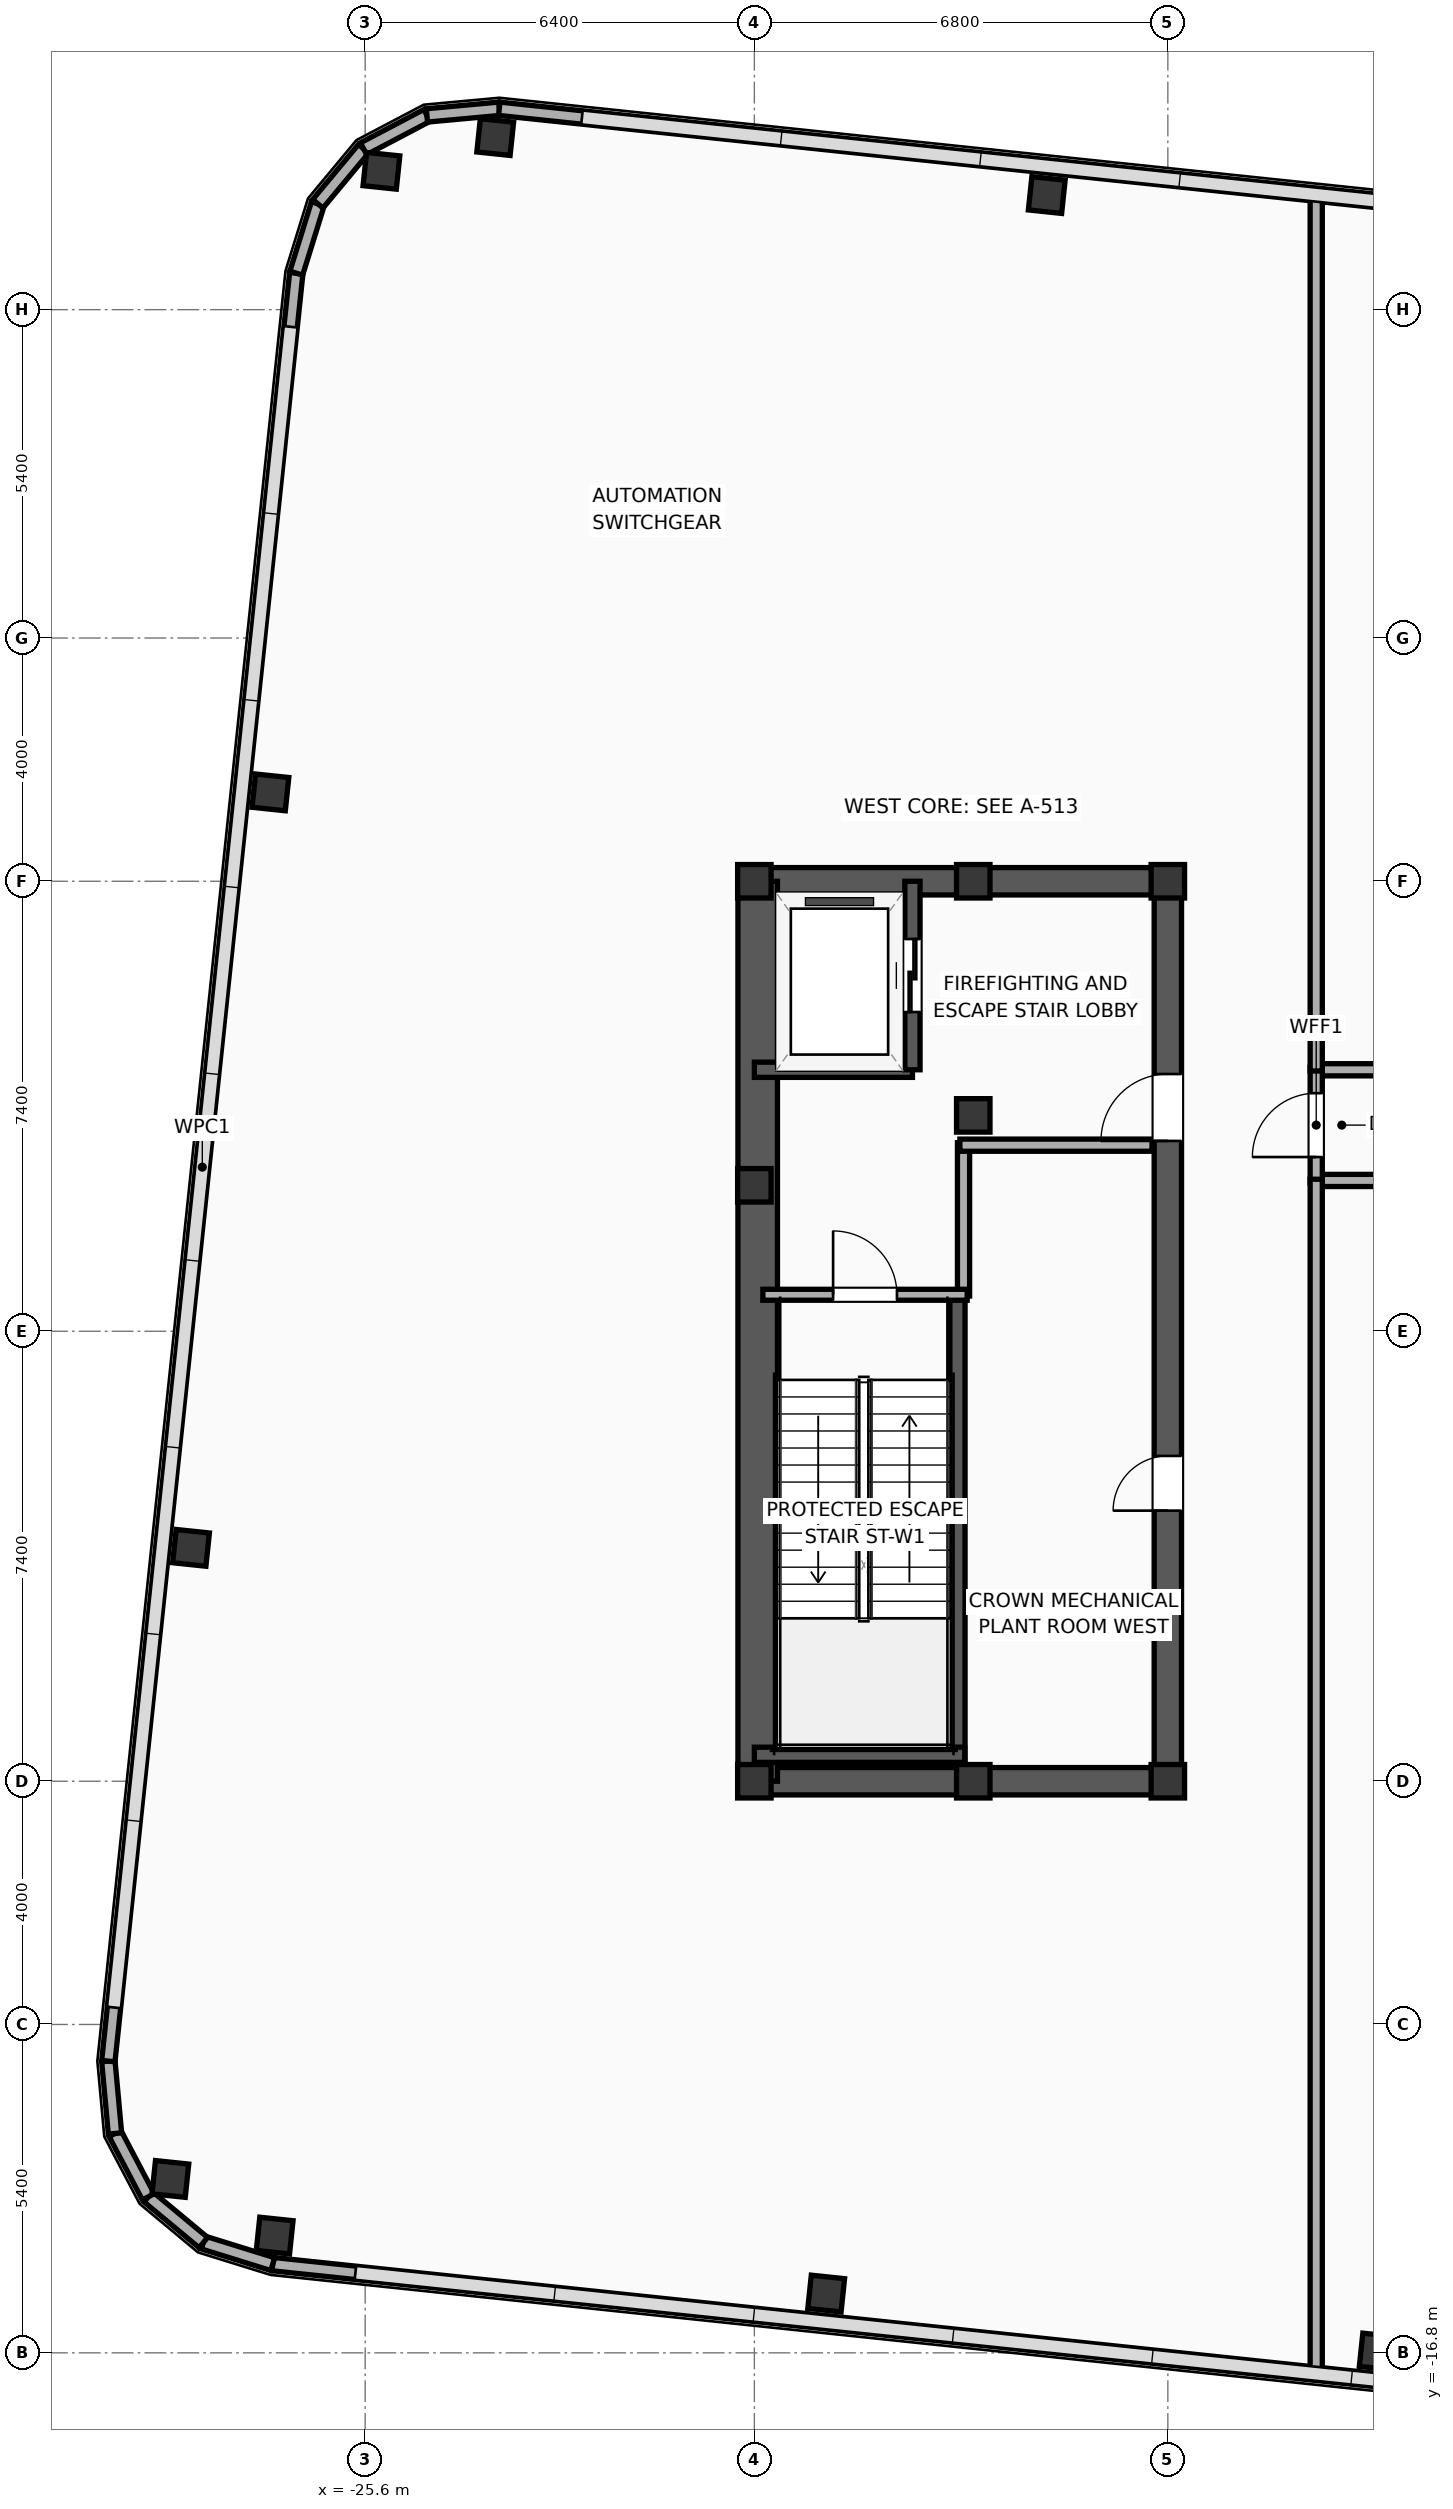
"""IFC4 building model, lengths in metres.
Left out: names, types, materials, properties, quantities, classifications, styles, units other than length and angle.
Written with IfcOpenShell. Run it as: python <this file> out.ifc"""

import sys

from ifc_helpers import new_model, si_unit, direction, frame, frame_2d, origin, origin_2d, place, context, subcontext, project, spatial, rectangle, hollow_rectangle, extrude, element, fill, save


model = new_model("IFC4")
c1 = context("Model", 3, precision=1e-05, world=origin(), true_north=direction((0.0, 1.0)))
c2 = subcontext(c1, "Body", "Model", "MODEL_VIEW")
j1 = project(units=[si_unit("LENGTHUNIT", "METRE"), si_unit("PLANEANGLEUNIT", "RADIAN")], contexts=[c1])
p1 = place(None, origin())
s1 = spatial("IfcSite", under=j1, at=p1, CompositionType="ELEMENT")
p2 = place(p1, origin())
s2 = spatial("IfcBuilding", under=s1, at=p2, CompositionType="ELEMENT")
p3 = place(p2, frame((0.0, 0.0, 316.0)))
s3 = spatial("IfcBuildingStorey", under=s2, at=p3, CompositionType="ELEMENT", Elevation=316.0)
for number, where, z_axis, x_axis in (
    (1, (-19.2, -7.4, 0.0), (0.0, 0.0, 1.0), (1.0, 0.0, 0.0)),
    (2, (-19.2, 2.4, 0.0), (0.0, 0.0, 1.0), (1.0, 0.0, 0.0)),
    (3, (-19.2, 7.4, 0.0), (0.0, 0.0, 1.0), (1.0, 0.0, 0.0)),
    (4, (-15.6, -7.4, 0.0), (0.0, 0.0, 1.0), (1.0, 0.0, 0.0)),
    (5, (-15.6, 7.4, 0.0), (0.0, 0.0, 1.0), (1.0, 0.0, 0.0)),
    (6, (-12.4, -7.4, 0.0), (0.0, 0.0, 1.0), (1.0, 0.0, 0.0)),
    (7, (-15.6, 3.55, 0.0), (0.0, 0.0, 1.0), (1.0, 0.0, 0.0)),
    (8, (-12.4, 7.4, 0.0), (0.0, 0.0, 1.0), (1.0, 0.0, 0.0)),
):
    element("IfcColumn", number, at=place(p3, frame(where, z_axis=z_axis, x_axis=x_axis)), inside=s3, PredefinedType="COLUMN", context=c2, shape_type="SweptSolid", body=[
        extrude(hollow_rectangle(XDim=0.55, YDim=0.55, WallThickness=0.022, at=origin_2d()), origin(), (0.0, 0.0, 1.0), 5.3),
    ])
for number, where, z_axis, x_axis in (
    (9, (-19.425, -7.4, 0.0), (0.0, 0.0, 1.0), (1.0, 0.0, 0.0)),
    (10, (-19.425, 7.4, 0.0), (0.0, 0.0, 1.0), (1.0, 0.0, 0.0)),
):
    element("IfcWall", number, at=place(p3, frame(where, z_axis=z_axis, x_axis=x_axis)), inside=s3, PredefinedType="SHEAR", context=c2, shape_type="SweptSolid", body=[
        extrude(rectangle(XDim=7.25, YDim=0.45, at=frame_2d((3.625, 0.0))), origin(), (0.0, 0.0, 1.0), 5.025),
    ])
p4 = place(p3, frame((-19.145, -7.4, 0.0), z_axis=(0.0, 0.0, 1.0), x_axis=(0.0, 1.0, 0.0)))
e11 = element("IfcWall", 11, at=p4, inside=s3, PredefinedType="SHEAR", context=c2, shape_type="SweptSolid", body=[
    extrude(rectangle(XDim=14.8, YDim=0.65, at=frame_2d((7.4, 0.0))), origin(), (0.0, 0.0, 1.0), 5.025),
])
p5 = place(p3, frame((-12.4, -7.4, 0.0), z_axis=(0.0, 0.0, 1.0), x_axis=(0.0, 1.0, 0.0)))
e12 = element("IfcWall", 12, at=p5, inside=s3, PredefinedType="SHEAR", context=c2, shape_type="SweptSolid", body=[
    extrude(rectangle(XDim=14.8, YDim=0.45, at=frame_2d((7.4, 0.0))), origin(), (0.0, 0.0, 1.0), 5.025),
])
p6 = place(p5, frame((10.53, 0.0, 0.0)))
e13 = element("IfcOpeningElement", 13, at=p6, cuts=e12, PredefinedType="OPENING", context=c2, shape_type="SweptSolid", body=[
    extrude(rectangle(XDim=1.1, YDim=2.05, at=frame_2d((0.55, 1.025))), frame((0.0, 0.235, 0.0), z_axis=(0.0, -1.0, 0.0), x_axis=(1.0, 0.0, 0.0)), (0.0, 0.0, 1.0), 0.47),
])
p7 = place(p5, frame((4.45, 0.0, 0.0)))
e14 = element("IfcOpeningElement", 14, at=p7, cuts=e12, PredefinedType="OPENING", context=c2, shape_type="SweptSolid", body=[
    extrude(rectangle(XDim=0.9, YDim=2.05, at=frame_2d((0.45, 1.025))), frame((0.0, 0.235, 0.0), z_axis=(0.0, -1.0, 0.0), x_axis=(1.0, 0.0, 0.0)), (0.0, 0.0, 1.0), 0.47),
])
p8 = place(p3, frame((-15.86, -7.085, 0.0), z_axis=(0.0, 0.0, 1.0), x_axis=(0.0, 1.0, 0.0)))
e15 = element("IfcWall", 15, at=p8, inside=s3, PredefinedType="SOLIDWALL", context=c2, shape_type="SweptSolid", body=[
    extrude(rectangle(XDim=7.685, YDim=0.25, at=frame_2d((3.843, 0.0))), origin(), (0.0, 0.0, 1.0), 5.025),
])
p9 = place(p3, frame((-19.2, -6.965, 0.0), z_axis=(0.0, 0.0, 1.0), x_axis=(1.0, 0.0, 0.0)))
e16 = element("IfcWall", 16, at=p9, inside=s3, PredefinedType="SOLIDWALL", context=c2, shape_type="SweptSolid", body=[
    extrude(rectangle(XDim=3.46, YDim=0.25, at=frame_2d((1.73, 0.0))), origin(), (0.0, 0.0, 1.0), 5.025),
])
for number, where, z_axis, x_axis in (
    (17, (-27.089, -14.872, 0.0), (0.0, 0.0, 1.0), (0.995, -0.105, 0.0)),
    (18, (-18.019, -15.825, 0.0), (0.0, 0.0, 1.0), (0.995, -0.105, 0.0)),
    (19, (-8.948, -16.778, 0.0), (0.0, 0.0, 1.0), (0.995, -0.105, 0.0)),
    (20, (-14.392, 18.685, 0.0), (0.0, 0.0, 1.0), (0.995, -0.105, 0.0)),
    (21, (-23.461, 19.638, 0.0), (0.0, 0.0, 1.0), (0.995, -0.105, 0.0)),
    (22, (-25.333, 19.084, 0.0), (0.0, 0.0, 1.0), (0.995, -0.105, 0.0)),
    (23, (-27.158, 8.862, 0.0), (0.0, 0.0, 1.0), (0.995, -0.105, 0.0)),
    (24, (-28.464, -3.562, 0.0), (0.0, 0.0, 1.0), (0.995, -0.105, 0.0)),
    (25, (-28.804, -13.94, 0.0), (0.0, 0.0, 1.0), (0.995, -0.105, 0.0)),
):
    element("IfcColumn", number, at=place(p3, frame(where, z_axis=z_axis, x_axis=x_axis)), inside=s3, PredefinedType="COLUMN", context=c2, shape_type="SweptSolid", body=[
        extrude(hollow_rectangle(XDim=0.55, YDim=0.55, WallThickness=0.022, at=origin_2d()), origin(), (0.0, 0.0, 1.0), 5.3),
    ])
p10 = place(p3, frame((18.195, -20.104, 0.0), z_axis=(0.0, 0.0, 1.0), x_axis=(-0.994522116558, 0.104526358762, 0.0)))
e26 = element("IfcWall", 26, at=p10, inside=s3, PredefinedType="PARAPET", context=c2, shape_type="SweptSolid", body=[
    extrude(rectangle(XDim=45.564, YDim=0.22, at=frame_2d((22.782, 0.0))), origin(), (0.0, 0.0, 1.0), 1.2),
])
p11 = place(p3, frame((-27.12, -15.341, 0.0), z_axis=(0.0, 0.0, 1.0), x_axis=(-0.95499831015, 0.296611239858, 0.0)))
e27 = element("IfcWall", 27, at=p11, inside=s3, PredefinedType="PARAPET", context=c2, shape_type="SweptSolid", body=[
    extrude(rectangle(XDim=1.195, YDim=0.22, at=frame_2d((0.598, 0.0))), origin(), (0.0, 0.0, 1.0), 1.2),
])
p12 = place(p3, frame((-28.261, -14.987, 0.0), z_axis=(0.0, 0.0, 1.0), x_axis=(-0.768849923601, 0.639429272852, 0.0)))
e28 = element("IfcWall", 28, at=p12, inside=s3, PredefinedType="PARAPET", context=c2, shape_type="SweptSolid", body=[
    extrude(rectangle(XDim=1.177, YDim=0.22, at=frame_2d((0.588, 0.0))), origin(), (0.0, 0.0, 1.0), 1.2),
])
p13 = place(p3, frame((-29.167, -14.234, 0.0), z_axis=(0.0, 0.0, 1.0), x_axis=(-0.46554120999, 0.885026204019, 0.0)))
e29 = element("IfcWall", 29, at=p13, inside=s3, PredefinedType="PARAPET", context=c2, shape_type="SweptSolid", body=[
    extrude(rectangle(XDim=1.177, YDim=0.22, at=frame_2d((0.588, 0.0))), origin(), (0.0, 0.0, 1.0), 1.2),
])
p14 = place(p3, frame((-29.714, -13.192, 0.0), z_axis=(0.0, 0.0, 1.0), x_axis=(-0.091530451467, 0.995802277791, 0.0)))
e30 = element("IfcWall", 30, at=p14, inside=s3, PredefinedType="PARAPET", context=c2, shape_type="SweptSolid", body=[
    extrude(rectangle(XDim=1.195, YDim=0.22, at=frame_2d((0.598, 0.0))), origin(), (0.0, 0.0, 1.0), 1.2),
])
p15 = place(p3, frame((-29.824, -12.002, 0.0), z_axis=(0.0, 0.0, 1.0), x_axis=(0.104528313262, 0.994521911134, 0.0)))
e31 = element("IfcWall", 31, at=p15, inside=s3, PredefinedType="PARAPET", context=c2, shape_type="SweptSolid", body=[
    extrude(rectangle(XDim=29.564, YDim=0.22, at=frame_2d((14.782, 0.0))), origin(), (0.0, 0.0, 1.0), 1.2),
])
p16 = place(p3, frame((-26.733, 17.4, 0.0), z_axis=(0.0, 0.0, 1.0), x_axis=(0.296611239858, 0.95499831015, 0.0)))
e32 = element("IfcWall", 32, at=p16, inside=s3, PredefinedType="PARAPET", context=c2, shape_type="SweptSolid", body=[
    extrude(rectangle(XDim=1.195, YDim=0.22, at=frame_2d((0.598, 0.0))), origin(), (0.0, 0.0, 1.0), 1.2),
])
p17 = place(p3, frame((-26.379, 18.542, 0.0), z_axis=(0.0, 0.0, 1.0), x_axis=(0.639408628756, 0.768867092203, 0.0)))
e33 = element("IfcWall", 33, at=p17, inside=s3, PredefinedType="PARAPET", context=c2, shape_type="SweptSolid", body=[
    extrude(rectangle(XDim=1.177, YDim=0.22, at=frame_2d((0.588, 0.0))), origin(), (0.0, 0.0, 1.0), 1.2),
])
p18 = place(p3, frame((-25.626, 19.446, 0.0), z_axis=(0.0, 0.0, 1.0), x_axis=(0.884985697578, 0.465618207421, 0.0)))
e34 = element("IfcWall", 34, at=p18, inside=s3, PredefinedType="PARAPET", context=c2, shape_type="SweptSolid", body=[
    extrude(rectangle(XDim=1.177, YDim=0.22, at=frame_2d((0.589, 0.0))), origin(), (0.0, 0.0, 1.0), 1.2),
])
p19 = place(p3, frame((-24.585, 19.994, 0.0), z_axis=(0.0, 0.0, 1.0), x_axis=(0.995802277791, 0.091530451467, 0.0)))
e35 = element("IfcWall", 35, at=p19, inside=s3, PredefinedType="PARAPET", context=c2, shape_type="SweptSolid", body=[
    extrude(rectangle(XDim=1.195, YDim=0.22, at=frame_2d((0.598, 0.0))), origin(), (0.0, 0.0, 1.0), 1.2),
])
p20 = place(p3, frame((-23.395, 20.104, 0.0), z_axis=(0.0, 0.0, 1.0), x_axis=(0.994522116558, -0.104526358762, 0.0)))
e36 = element("IfcWall", 36, at=p20, inside=s3, PredefinedType="PARAPET", context=c2, shape_type="SweptSolid", body=[
    extrude(rectangle(XDim=45.564, YDim=0.22, at=frame_2d((22.782, 0.0))), origin(), (0.0, 0.0, 1.0), 1.2),
])
p21 = place(p3, frame((-19.2, 4.3, 0.0), z_axis=(0.0, 0.0, 1.0), x_axis=(1.0, 0.0, 0.0)))
e37 = element("IfcWall", 37, at=p21, inside=s3, PredefinedType="SOLIDWALL", context=c2, shape_type="SweptSolid", body=[
    extrude(rectangle(XDim=2.6, YDim=0.25, at=frame_2d((1.3, 0.0))), origin(), (0.0, 0.0, 1.0), 5.025),
])
p22 = place(p3, frame((-16.6, 4.3, 0.0), z_axis=(0.0, 0.0, 1.0), x_axis=(0.0, 1.0, 0.0)))
e38 = element("IfcWall", 38, at=p22, inside=s3, PredefinedType="SOLIDWALL", context=c2, shape_type="SweptSolid", body=[
    extrude(rectangle(XDim=3.1, YDim=0.25, at=frame_2d((1.55, 0.0))), origin(), (0.0, 0.0, 1.0), 5.025),
])
p23 = place(p22, frame((0.95, 0.0, 0.0)))
e39 = element("IfcOpeningElement", 39, at=p23, cuts=e38, PredefinedType="OPENING", context=c2, shape_type="SweptSolid", body=[
    extrude(rectangle(XDim=1.2, YDim=2.05, at=frame_2d((0.6, 1.025))), frame((0.0, 0.135, 0.0), z_axis=(0.0, -1.0, 0.0), x_axis=(1.0, 0.0, 0.0)), (0.0, 0.0, 1.0), 0.27),
])
p24 = place(p3, frame((-15.76, 0.58, 0.0), z_axis=(0.0, 0.0, 1.0), x_axis=(0.0, 1.0, 0.0)))
e40 = element("IfcWall", 40, at=p24, inside=s3, PredefinedType="PARTITIONING", context=c2, shape_type="SweptSolid", body=[
    extrude(rectangle(XDim=2.52, YDim=0.2, at=frame_2d((1.26, 0.0))), origin(), (0.0, 0.0, 1.0), 5.025),
])
p25 = place(p3, frame((-15.82, 3.06, 0.0), z_axis=(0.0, 0.0, 1.0), x_axis=(1.0, 0.0, 0.0)))
e41 = element("IfcWall", 41, at=p25, inside=s3, PredefinedType="PARTITIONING", context=c2, shape_type="SweptSolid", body=[
    extrude(rectangle(XDim=3.16, YDim=0.2, at=frame_2d((1.58, 0.0))), origin(), (0.0, 0.0, 1.0), 5.025),
])
p26 = place(p3, frame((-19.06, 0.6, 0.0), z_axis=(0.0, 0.0, 1.0), x_axis=(1.0, 0.0, 0.0)))
e42 = element("IfcWall", 42, at=p26, inside=s3, PredefinedType="PARTITIONING", context=c2, shape_type="SweptSolid", body=[
    extrude(rectangle(XDim=3.36, YDim=0.18, at=frame_2d((1.68, 0.0))), origin(), (0.0, 0.0, 1.0), 5.025),
])
p27 = place(p26, frame((1.155, 0.0, 0.0)))
e43 = element("IfcOpeningElement", 43, at=p27, cuts=e42, PredefinedType="OPENING", context=c2, shape_type="SweptSolid", body=[
    extrude(rectangle(XDim=1.05, YDim=2.05, at=frame_2d((0.525, 1.025))), frame((0.0, 0.1, 0.0), z_axis=(0.0, -1.0, 0.0), x_axis=(1.0, 0.0, 0.0)), (0.0, 0.0, 1.0), 0.2),
])
p28 = place(p3, frame((-9.98, 2.48, 0.0), z_axis=(0.0, 0.0, 1.0), x_axis=(1.0, 0.0, 0.0)))
e44 = element("IfcWall", 44, at=p28, inside=s3, PredefinedType="PARTITIONING", context=c2, shape_type="SweptSolid", body=[
    extrude(rectangle(XDim=19.96, YDim=0.2, at=frame_2d((9.98, 0.0))), origin(), (0.0, 0.0, 1.0), 4.595),
])
p29 = place(p28, frame((9.28, 0.0, 0.0)))
e45 = element("IfcOpeningElement", 45, at=p29, cuts=e44, PredefinedType="OPENING", context=c2, shape_type="SweptSolid", body=[
    extrude(rectangle(XDim=1.4, YDim=2.05, at=frame_2d((0.7, 1.025))), frame((0.0, 0.11, 0.0), z_axis=(0.0, -1.0, 0.0), x_axis=(1.0, 0.0, 0.0)), (0.0, 0.0, 1.0), 0.22),
])
p30 = place(p3, frame((-9.98, 4.3, 0.0), z_axis=(0.0, 0.0, 1.0), x_axis=(1.0, 0.0, 0.0)))
e46 = element("IfcWall", 46, at=p30, inside=s3, PredefinedType="PARTITIONING", context=c2, shape_type="SweptSolid", body=[
    extrude(rectangle(XDim=19.96, YDim=0.2, at=frame_2d((9.98, 0.0))), origin(), (0.0, 0.0, 1.0), 5.025),
])
p31 = place(p30, frame((9.28, 0.0, 0.0)))
e47 = element("IfcOpeningElement", 47, at=p31, cuts=e46, PredefinedType="OPENING", context=c2, shape_type="SweptSolid", body=[
    extrude(rectangle(XDim=1.4, YDim=2.05, at=frame_2d((0.7, 1.025))), frame((0.0, 0.11, 0.0), z_axis=(0.0, -1.0, 0.0), x_axis=(1.0, 0.0, 0.0)), (0.0, 0.0, 1.0), 0.22),
])
p32 = place(p3, frame((-9.96, 2.44, 0.0), z_axis=(0.0, 0.0, 1.0), x_axis=(0.0, 1.0, 0.0)))
e48 = element("IfcWall", 48, at=p32, inside=s3, PredefinedType="PARTITIONING", context=c2, shape_type="SweptSolid", body=[
    extrude(rectangle(XDim=1.9, YDim=0.2, at=frame_2d((0.95, 0.0))), origin(), (0.0, 0.0, 1.0), 5.025),
])
p33 = place(p32, frame((0.425, 0.0, 0.0)))
e49 = element("IfcOpeningElement", 49, at=p33, cuts=e48, PredefinedType="OPENING", context=c2, shape_type="SweptSolid", body=[
    extrude(rectangle(XDim=1.05, YDim=2.05, at=frame_2d((0.525, 1.025))), frame((0.0, 0.11, 0.0), z_axis=(0.0, -1.0, 0.0), x_axis=(1.0, 0.0, 0.0)), (0.0, 0.0, 1.0), 0.22),
])
p34 = place(p3, frame((-9.96, -17.125, 0.0), z_axis=(0.0, 0.0, 1.0), x_axis=(0.0, 1.0, 0.0)))
e50 = element("IfcWall", 50, at=p34, inside=s3, PredefinedType="PARTITIONING", context=c2, shape_type="SweptSolid", body=[
    extrude(rectangle(XDim=19.625, YDim=0.2, at=frame_2d((9.812, 0.0))), origin(), (0.0, 0.0, 1.0), 3.915),
])
p35 = place(p3, frame((-9.96, 4.28, 0.0), z_axis=(0.0, 0.0, 1.0), x_axis=(0.0, 1.0, 0.0)))
e51 = element("IfcWall", 51, at=p35, inside=s3, PredefinedType="PARTITIONING", context=c2, shape_type="SweptSolid", body=[
    extrude(rectangle(XDim=14.392, YDim=0.2, at=frame_2d((7.196, 0.0))), origin(), (0.0, 0.0, 1.0), 5.025),
])
p36 = place(p23, origin())
e52 = element("IfcDoor", 52, at=p36, inside=s3, OperationType="SLIDING_TO_LEFT", PredefinedType="DOOR", context=c2, shape_type="SweptSolid", body=[
    extrude(rectangle(XDim=1.2, YDim=2.05, at=frame_2d((0.6, 1.025))), frame((0.0, 0.025, 0.0), z_axis=(0.0, -1.0, 0.0), x_axis=(1.0, 0.0, 0.0)), (0.0, 0.0, 1.0), 0.05),
])
fill(e39, e52)
p37 = place(p27, origin())
e53 = element("IfcDoor", 53, at=p37, inside=s3, OperationType="SINGLE_SWING_LEFT", PredefinedType="DOOR", context=c2, shape_type="SweptSolid", body=[
    extrude(rectangle(XDim=1.05, YDim=2.05, at=frame_2d((0.525, 1.025))), frame((0.0, 0.025, 0.0), z_axis=(0.0, -1.0, 0.0), x_axis=(1.0, 0.0, 0.0)), (0.0, 0.0, 1.0), 0.05),
])
fill(e43, e53)
p38 = place(p33, origin())
e54 = element("IfcDoor", 54, at=p38, inside=s3, OperationType="SINGLE_SWING_LEFT", PredefinedType="DOOR", context=c2, shape_type="SweptSolid", body=[
    extrude(rectangle(XDim=1.05, YDim=2.05, at=frame_2d((0.525, 1.025))), frame((0.0, 0.025, 0.0), z_axis=(0.0, -1.0, 0.0), x_axis=(1.0, 0.0, 0.0)), (0.0, 0.0, 1.0), 0.05),
])
fill(e49, e54)
p39 = place(p6, origin())
e55 = element("IfcDoor", 55, at=p39, inside=s3, OperationType="SINGLE_SWING_LEFT", PredefinedType="DOOR", context=c2, shape_type="SweptSolid", body=[
    extrude(rectangle(XDim=1.1, YDim=2.05, at=frame_2d((0.55, 1.025))), frame((0.0, 0.025, 0.0), z_axis=(0.0, -1.0, 0.0), x_axis=(1.0, 0.0, 0.0)), (0.0, 0.0, 1.0), 0.05),
])
fill(e13, e55)
p40 = place(p7, origin())
e56 = element("IfcDoor", 56, at=p40, inside=s3, OperationType="SINGLE_SWING_LEFT", PredefinedType="DOOR", context=c2, shape_type="SweptSolid", body=[
    extrude(rectangle(XDim=0.9, YDim=2.05, at=frame_2d((0.45, 1.025))), frame((0.0, 0.025, 0.0), z_axis=(0.0, -1.0, 0.0), x_axis=(1.0, 0.0, 0.0)), (0.0, 0.0, 1.0), 0.05),
])
fill(e14, e56)
save(model, sys.argv[1])
